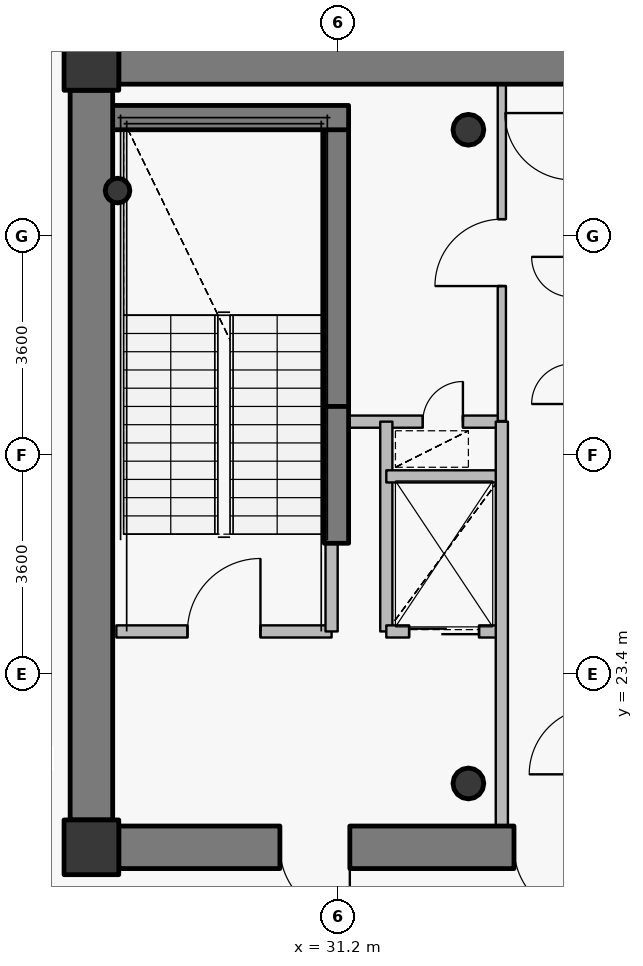
"""IFC4 building model, lengths in metres.
Left out: names, types, materials, properties, quantities, classifications, styles, units other than length and angle.
Written with IfcOpenShell. Run it as: python <this file> out.ifc"""

import sys

from ifc_helpers import new_model, si_unit, direction, frame, frame_2d, origin, origin_2d, place, context, subcontext, project, spatial, rectangle, hollow_circle, extrude, source, transform, mapped, element, fill, save


model = new_model("IFC4")
c1 = context("Model", 3, precision=1e-05, world=origin(), true_north=direction((0.0, 1.0)))
c2 = subcontext(c1, "Body", "Model", "MODEL_VIEW")
j1 = project(units=[si_unit("LENGTHUNIT", "METRE"), si_unit("PLANEANGLEUNIT", "RADIAN")], contexts=[c1])
p1 = place(None, origin())
s1 = spatial("IfcSite", under=j1, at=p1, CompositionType="ELEMENT")
p2 = place(p1, origin())
s2 = spatial("IfcBuilding", under=s1, at=p2, CompositionType="ELEMENT")
p3 = place(p2, frame((0.0, 0.0, 331.6)))
s3 = spatial("IfcBuildingStorey", under=s2, at=p3, CompositionType="ELEMENT", Elevation=331.6)
for number, where, z_axis, x_axis in (
    (1, (27.15, 20.55, 0.0), (0.0, 0.0, 1.0), (1.0, 0.0, 0.0)),
    (2, (27.15, 33.45, 0.0), (0.0, 0.0, 1.0), (1.0, 0.0, 0.0)),
):
    element("IfcColumn", number, at=place(p3, frame(where, z_axis=z_axis, x_axis=x_axis)), inside=s3, PredefinedType="COLUMN", context=c2, shape_type="SweptSolid", body=[
        extrude(rectangle(XDim=0.9, YDim=0.9, at=origin_2d()), origin(), (0.0, 0.0, 1.0), 3.8),
    ])
for number, where, z_axis, x_axis in (
    (3, (33.35, 21.6, 0.0), (0.0, 0.0, 1.0), (1.0, 0.0, 0.0)),
    (4, (33.35, 32.35, 0.0), (0.0, 0.0, 1.0), (1.0, 0.0, 0.0)),
):
    element("IfcColumn", number, at=place(p3, frame(where, z_axis=z_axis, x_axis=x_axis)), inside=s3, PredefinedType="COLUMN", context=c2, shape_type="SweptSolid", body=[
        extrude(hollow_circle(Radius=0.254, WallThickness=0.02, at=origin_2d()), origin(), (0.0, 0.0, 1.0), 3.8),
    ])
p4 = place(p3, frame((31.18, 27.8, 0.0), z_axis=(0.0, 0.0, 1.0), x_axis=(0.0, 1.0, 0.0)))
e5 = element("IfcWall", 5, at=p4, inside=s3, PredefinedType="SHEAR", context=c2, shape_type="SweptSolid", body=[
    extrude(rectangle(XDim=4.75, YDim=0.4, at=frame_2d((2.375, 0.0))), origin(), (0.0, 0.0, 1.0), 3.8),
])
p5 = place(p3, frame((27.25, 32.55, 0.0), z_axis=(0.0, 0.0, 1.0), x_axis=(1.0, 0.0, 0.0)))
e6 = element("IfcWall", 6, at=p5, inside=s3, PredefinedType="SHEAR", context=c2, shape_type="SweptSolid", body=[
    extrude(rectangle(XDim=4.13, YDim=0.4, at=frame_2d((2.065, 0.0))), origin(), (0.0, 0.0, 1.0), 3.8),
])
p6 = place(p3, frame((27.58, 31.35, 0.0), z_axis=(0.0, 0.0, 1.0), x_axis=(1.0, 0.0, 0.0)))
e7 = element("IfcColumn", 7, at=p6, inside=s3, PredefinedType="COLUMN", context=c2, shape_type="SweptSolid", body=[
    extrude(hollow_circle(Radius=0.203, WallThickness=0.016, at=origin_2d()), origin(), (0.0, 0.0, 1.0), 3.8),
])
p7 = place(p3, frame((27.6, 33.45, 0.0), z_axis=(0.0, 0.0, 1.0), x_axis=(1.0, 0.0, 0.0)))
e8 = element("IfcWall", 8, at=p7, inside=s3, PredefinedType="SHEAR", context=c2, shape_type="SweptSolid", body=[
    extrude(rectangle(XDim=16.8, YDim=0.7, at=frame_2d((8.4, 0.0))), origin(), (0.0, 0.0, 1.0), 3.1),
])
p8 = place(p7, frame((12.85, 0.0, 0.0)))
e9 = element("IfcOpeningElement", 9, at=p8, cuts=e8, PredefinedType="OPENING", context=c2, shape_type="SweptSolid", body=[
    extrude(rectangle(XDim=1.15, YDim=2.15, at=origin_2d()), frame((0.575, 0.36, 1.075), z_axis=(0.0, -1.0, 0.0), x_axis=(1.0, 0.0, 0.0)), (0.0, 0.0, 1.0), 0.72),
])
p9 = place(p3, frame((44.4, 20.55, 0.0), z_axis=(0.0, 0.0, 1.0), x_axis=(-1.0, 0.0, 0.0)))
e10 = element("IfcWall", 10, at=p9, inside=s3, PredefinedType="SHEAR", context=c2, shape_type="SweptSolid", body=[
    extrude(rectangle(XDim=16.8, YDim=0.7, at=frame_2d((8.4, 0.0))), origin(), (0.0, 0.0, 1.0), 3.1),
])
p10 = place(p9, frame((13.0, 0.0, 0.0)))
e11 = element("IfcOpeningElement", 11, at=p10, cuts=e10, PredefinedType="OPENING", context=c2, shape_type="SweptSolid", body=[
    extrude(rectangle(XDim=1.15, YDim=2.15, at=origin_2d()), frame((0.575, 0.36, 1.075), z_axis=(0.0, -1.0, 0.0), x_axis=(1.0, 0.0, 0.0)), (0.0, 0.0, 1.0), 0.72),
])
p11 = place(p9, frame((9.15, 0.0, 0.0)))
e12 = element("IfcOpeningElement", 12, at=p11, cuts=e10, PredefinedType="OPENING", context=c2, shape_type="SweptSolid", body=[
    extrude(rectangle(XDim=1.15, YDim=2.15, at=origin_2d()), frame((0.575, 0.36, 1.075), z_axis=(0.0, -1.0, 0.0), x_axis=(1.0, 0.0, 0.0)), (0.0, 0.0, 1.0), 0.72),
])
p12 = place(p3, frame((27.15, 21.0, 0.0), z_axis=(0.0, 0.0, 1.0), x_axis=(0.0, 1.0, 0.0)))
e13 = element("IfcWall", 13, at=p12, inside=s3, PredefinedType="SHEAR", context=c2, shape_type="SweptSolid", body=[
    extrude(rectangle(XDim=12.0, YDim=0.7, at=frame_2d((6.0, 0.0))), origin(), (0.0, 0.0, 1.0), 3.1),
])
p13 = place(p3, frame((31.18, 25.55, 0.0), z_axis=(0.0, 0.0, 1.0), x_axis=(0.0, 1.0, 0.0)))
e14 = element("IfcWall", 14, at=p13, inside=s3, PredefinedType="SHEAR", context=c2, shape_type="SweptSolid", body=[
    extrude(rectangle(XDim=2.25, YDim=0.4, at=frame_2d((1.125, 0.0))), origin(), (0.0, 0.0, 1.0), 3.15),
])
p14 = place(p3, frame((27.56, 24.1, 0.0), z_axis=(0.0, 0.0, 1.0), x_axis=(1.0, 0.0, 0.0)))
e15 = element("IfcWall", 15, at=p14, inside=s3, PredefinedType="PARTITIONING", context=c2, shape_type="SweptSolid", body=[
    extrude(rectangle(XDim=3.54, YDim=0.2, at=frame_2d((1.77, 0.0))), origin(), (0.0, 0.0, 1.0), 3.55),
])
p15 = place(p14, frame((1.17, 0.0, 0.0)))
e16 = element("IfcOpeningElement", 16, at=p15, cuts=e15, PredefinedType="OPENING", context=c2, shape_type="SweptSolid", body=[
    extrude(rectangle(XDim=1.2, YDim=2.15, at=origin_2d()), frame((0.6, 0.11, 1.075), z_axis=(0.0, -1.0, 0.0), x_axis=(1.0, 0.0, 0.0)), (0.0, 0.0, 1.0), 0.22),
])
p16 = place(p3, frame((31.1, 24.1, 0.0), z_axis=(0.0, 0.0, 1.0), x_axis=(0.0, 1.0, 0.0)))
e17 = element("IfcWall", 17, at=p16, inside=s3, PredefinedType="PARTITIONING", context=c2, shape_type="SweptSolid", body=[
    extrude(rectangle(XDim=1.44, YDim=0.2, at=frame_2d((0.72, 0.0))), origin(), (0.0, 0.0, 1.0), 3.55),
])
p17 = place(p3, frame((31.1, 27.55, 0.0), z_axis=(0.0, 0.0, 1.0), x_axis=(1.0, 0.0, 0.0)))
e18 = element("IfcWall", 18, at=p17, inside=s3, PredefinedType="PARTITIONING", context=c2, shape_type="SweptSolid", body=[
    extrude(rectangle(XDim=2.8, YDim=0.2, at=frame_2d((1.4, 0.0))), origin(), (0.0, 0.0, 1.0), 3.135),
])
p18 = place(p17, frame((1.5, 0.0, 0.0)))
e19 = element("IfcOpeningElement", 19, at=p18, cuts=e18, PredefinedType="OPENING", context=c2, shape_type="SweptSolid", body=[
    extrude(rectangle(XDim=0.66, YDim=2.05, at=origin_2d()), frame((0.33, 0.11, 1.025), z_axis=(0.0, -1.0, 0.0), x_axis=(1.0, 0.0, 0.0)), (0.0, 0.0, 1.0), 0.22),
])
p19 = place(p3, frame((32.0, 24.1, 0.0), z_axis=(0.0, 0.0, 1.0), x_axis=(0.0, 1.0, 0.0)))
e20 = element("IfcWall", 20, at=p19, inside=s3, PredefinedType="PARTITIONING", context=c2, shape_type="SweptSolid", body=[
    extrude(rectangle(XDim=3.45, YDim=0.2, at=frame_2d((1.725, 0.0))), origin(), (0.0, 0.0, 1.0), 3.55),
])
p20 = place(p3, frame((32.0, 24.1, 0.0), z_axis=(0.0, 0.0, 1.0), x_axis=(1.0, 0.0, 0.0)))
e21 = element("IfcWall", 21, at=p20, inside=s3, PredefinedType="PARTITIONING", context=c2, shape_type="SweptSolid", body=[
    extrude(rectangle(XDim=1.9, YDim=0.2, at=frame_2d((0.95, 0.0))), origin(), (0.0, 0.0, 1.0), 3.135),
])
p21 = place(p20, frame((0.375, 0.0, 0.0)))
e22 = element("IfcOpeningElement", 22, at=p21, cuts=e21, PredefinedType="OPENING", context=c2, shape_type="SweptSolid", body=[
    extrude(rectangle(XDim=1.15, YDim=2.15, at=origin_2d()), frame((0.575, 0.11, 1.075), z_axis=(0.0, -1.0, 0.0), x_axis=(1.0, 0.0, 0.0)), (0.0, 0.0, 1.0), 0.22),
])
p22 = place(p3, frame((32.0, 26.65, 0.0), z_axis=(0.0, 0.0, 1.0), x_axis=(1.0, 0.0, 0.0)))
e23 = element("IfcWall", 23, at=p22, inside=s3, PredefinedType="PARTITIONING", context=c2, shape_type="SweptSolid", body=[
    extrude(rectangle(XDim=1.9, YDim=0.2, at=frame_2d((0.95, 0.0))), origin(), (0.0, 0.0, 1.0), 3.135),
])
p23 = place(p3, frame((33.9, 20.9, 0.0), z_axis=(0.0, 0.0, 1.0), x_axis=(0.0, 1.0, 0.0)))
e24 = element("IfcWall", 24, at=p23, inside=s3, PredefinedType="PARTITIONING", context=c2, shape_type="SweptSolid", body=[
    extrude(rectangle(XDim=6.65, YDim=0.2, at=frame_2d((3.325, 0.0))), origin(), (0.0, 0.0, 1.0), 3.135),
])
p24 = place(p3, frame((33.9, 27.56, 0.0), z_axis=(0.0, 0.0, 1.0), x_axis=(0.0, 1.0, 0.0)))
e25 = element("IfcWall", 25, at=p24, inside=s3, PredefinedType="PARTITIONING", context=c2, shape_type="SweptSolid", body=[
    extrude(rectangle(XDim=5.54, YDim=0.135, at=frame_2d((2.77, 0.0))), origin(), (0.0, 0.0, 1.0), 3.135),
])
p25 = place(p24, frame((2.22, 0.0, 0.0)))
e26 = element("IfcOpeningElement", 26, at=p25, cuts=e25, PredefinedType="OPENING", context=c2, shape_type="SweptSolid", body=[
    extrude(rectangle(XDim=1.1, YDim=2.15, at=origin_2d()), frame((0.55, 0.078, 1.075), z_axis=(0.0, -1.0, 0.0), x_axis=(1.0, 0.0, 0.0)), (0.0, 0.0, 1.0), 0.155),
])
p26 = place(p3, frame((26.8, 33.492, 0.0), z_axis=(0.0, 0.0, 1.0), x_axis=(0.0, -1.0, 0.0)))
e27 = element("IfcWall", 27, at=p26, inside=s3, PredefinedType="PARTITIONING", context=c2, shape_type="SweptSolid", body=[
    extrude(rectangle(XDim=0.482, YDim=0.135, at=frame_2d((0.241, 0.0))), origin(), (0.0, 0.0, 1.0), 3.55),
])
p27 = place(p3, frame((26.8, 20.99, 0.0), z_axis=(0.0, 0.0, 1.0), x_axis=(0.0, -1.0, 0.0)))
e28 = element("IfcWall", 28, at=p27, inside=s3, PredefinedType="PARTITIONING", context=c2, shape_type="SweptSolid", body=[
    extrude(rectangle(XDim=0.79, YDim=0.135, at=frame_2d((0.395, 0.0))), origin(), (0.0, 0.0, 1.0), 3.085),
])
p28 = place(p3, frame((27.107, 20.2, 0.0), z_axis=(0.0, 0.0, 1.0), x_axis=(1.0, 0.0, 0.0)))
e29 = element("IfcWall", 29, at=p28, inside=s3, PredefinedType="PARTITIONING", context=c2, shape_type="SweptSolid", body=[
    extrude(rectangle(XDim=0.483, YDim=0.135, at=frame_2d((0.241, 0.0))), origin(), (0.0, 0.0, 1.0), 3.085),
])
m1 = source(origin(), c2, "Body", "SweptSolid", [
    extrude(rectangle(XDim=1.15, YDim=2.15, at=origin_2d()), frame((0.575, 0.025, 1.075), z_axis=(0.0, -1.0, 0.0), x_axis=(1.0, 0.0, 0.0)), (0.0, 0.0, 1.0), 0.05),
])
p29 = place(p10, origin())
e30 = element("IfcDoor", 30, at=p29, inside=s3, OperationType="SINGLE_SWING_LEFT", PredefinedType="DOOR", context=c2, shape_type="MappedRepresentation", body=[
    mapped(m1, transform((0.0, 0.0, 0.0), x_axis=(1.0, 0.0, 0.0), y_axis=(0.0, 1.0, 0.0), z_axis=(0.0, 0.0, 1.0), scale=1.0)),
])
fill(e11, e30)
p30 = place(p11, origin())
e31 = element("IfcDoor", 31, at=p30, inside=s3, OperationType="SINGLE_SWING_LEFT", PredefinedType="DOOR", context=c2, shape_type="MappedRepresentation", body=[
    mapped(m1, transform((0.0, 0.0, 0.0), x_axis=(1.0, 0.0, 0.0), y_axis=(0.0, 1.0, 0.0), z_axis=(0.0, 0.0, 1.0), scale=1.0)),
])
fill(e12, e31)
m2 = source(origin(), c2, "Body", "SweptSolid", [
    extrude(rectangle(XDim=1.2, YDim=2.15, at=origin_2d()), frame((0.6, 0.025, 1.075), z_axis=(0.0, -1.0, 0.0), x_axis=(1.0, 0.0, 0.0)), (0.0, 0.0, 1.0), 0.05),
])
p31 = place(p15, origin())
e32 = element("IfcDoor", 32, at=p31, inside=s3, OperationType="SINGLE_SWING_RIGHT", PredefinedType="DOOR", context=c2, shape_type="MappedRepresentation", body=[
    mapped(m2, transform((0.0, 0.0, 0.0), x_axis=(1.0, 0.0, 0.0), y_axis=(0.0, 1.0, 0.0), z_axis=(0.0, 0.0, 1.0), scale=1.0)),
])
fill(e16, e32)
m3 = source(origin(), c2, "Body", "SweptSolid", [
    extrude(rectangle(XDim=1.15, YDim=2.15, at=origin_2d()), frame((0.575, 0.025, 1.075), z_axis=(0.0, -1.0, 0.0), x_axis=(1.0, 0.0, 0.0)), (0.0, 0.0, 1.0), 0.05),
])
p32 = place(p21, origin())
e33 = element("IfcDoor", 33, at=p32, inside=s3, OperationType="DOUBLE_DOOR_SLIDING", PredefinedType="USERDEFINED", context=c2, shape_type="MappedRepresentation", body=[
    mapped(m3, transform((0.0, 0.0, 0.0), x_axis=(1.0, 0.0, 0.0), y_axis=(0.0, 1.0, 0.0), z_axis=(0.0, 0.0, 1.0), scale=1.0)),
])
fill(e22, e33)
m4 = source(origin(), c2, "Body", "SweptSolid", [
    extrude(rectangle(XDim=1.1, YDim=2.15, at=origin_2d()), frame((0.55, 0.025, 1.075), z_axis=(0.0, -1.0, 0.0), x_axis=(1.0, 0.0, 0.0)), (0.0, 0.0, 1.0), 0.05),
])
p33 = place(p25, origin())
e34 = element("IfcDoor", 34, at=p33, inside=s3, OperationType="SINGLE_SWING_LEFT", PredefinedType="DOOR", context=c2, shape_type="MappedRepresentation", body=[
    mapped(m4, transform((0.0, 0.0, 0.0), x_axis=(1.0, 0.0, 0.0), y_axis=(0.0, 1.0, 0.0), z_axis=(0.0, 0.0, 1.0), scale=1.0)),
])
fill(e26, e34)
m5 = source(origin(), c2, "Body", "SweptSolid", [
    extrude(rectangle(XDim=0.66, YDim=2.05, at=origin_2d()), frame((0.33, 0.025, 1.025), z_axis=(0.0, -1.0, 0.0), x_axis=(1.0, 0.0, 0.0)), (0.0, 0.0, 1.0), 0.05),
])
p34 = place(p18, origin())
e35 = element("IfcDoor", 35, at=p34, inside=s3, OperationType="SINGLE_SWING_RIGHT", PredefinedType="USERDEFINED", context=c2, shape_type="MappedRepresentation", body=[
    mapped(m5, transform((0.0, 0.0, 0.0), x_axis=(1.0, 0.0, 0.0), y_axis=(0.0, 1.0, 0.0), z_axis=(0.0, 0.0, 1.0), scale=1.0)),
])
fill(e19, e35)
save(model, sys.argv[1])
